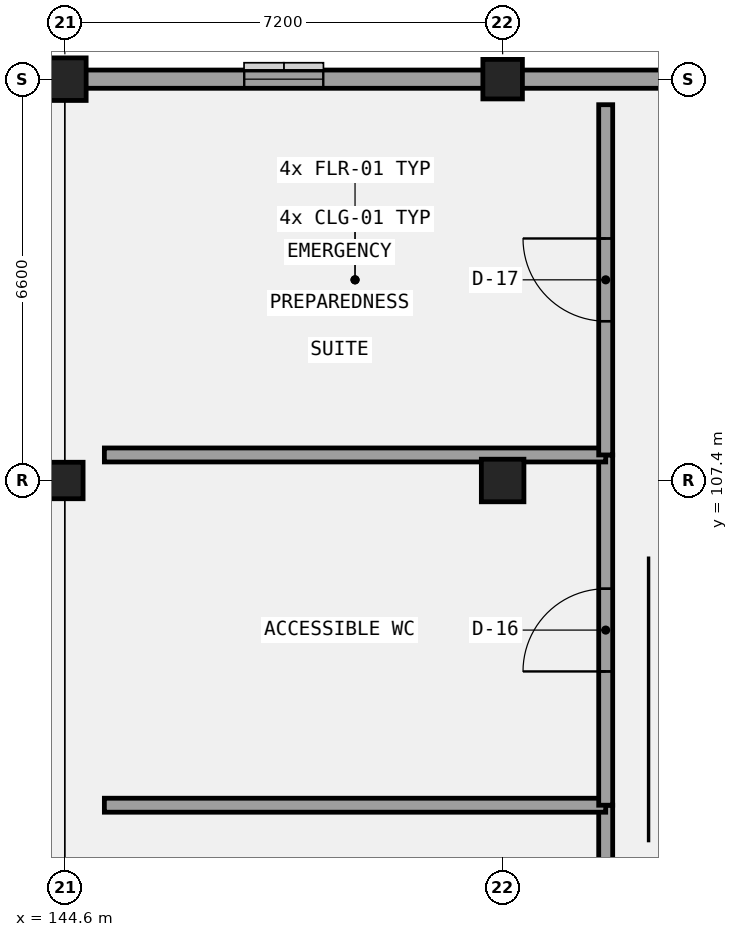
"""IFC4 building model, lengths in metres.
Left out: names, types, materials, properties, quantities, classifications, styles, units other than length and angle.
Written with IfcOpenShell. Run it as: python <this file> out.ifc"""

import sys

from ifc_helpers import new_model, si_unit, direction, frame, frame_2d, origin, origin_2d, place, context, subcontext, project, spatial, rectangle, extrude, element, fill, save


model = new_model("IFC4")
c1 = context("Model", 3, precision=1e-05, world=origin(), true_north=direction((0.0, 1.0)))
c2 = subcontext(c1, "Body", "Model", "MODEL_VIEW")
j1 = project(units=[si_unit("LENGTHUNIT", "METRE"), si_unit("PLANEANGLEUNIT", "RADIAN")], contexts=[c1])
p1 = place(None, origin())
s1 = spatial("IfcSite", under=j1, at=p1, CompositionType="ELEMENT")
p2 = place(p1, origin())
s2 = spatial("IfcBuilding", under=s1, at=p2, CompositionType="ELEMENT")
p3 = place(p2, frame((0.0, 0.0, 9.6)))
s3 = spatial("IfcBuildingStorey", under=s2, at=p3, CompositionType="ELEMENT", Elevation=9.6)
p4 = place(p3, frame((144.6, 107.4, 0.0), z_axis=(0.0, 0.0, 1.0), x_axis=(1.0, 0.0, 0.0)))
e1 = element("IfcColumn", 1, at=p4, inside=s3, PredefinedType="COLUMN", context=c2, shape_type="SweptSolid", body=[
    extrude(rectangle(XDim=0.6, YDim=0.6, at=origin_2d()), origin(), (0.0, 0.0, 1.0), 4.2),
])
for number, where, z_axis, x_axis in (
    (2, (144.6, 114.0, 0.0), (0.0, 0.0, 1.0), (1.0, 0.0, 0.0)),
    (3, (151.8, 107.4, 0.0), (0.0, 0.0, 1.0), (1.0, 0.0, 0.0)),
):
    element("IfcColumn", number, at=place(p3, frame(where, z_axis=z_axis, x_axis=x_axis)), inside=s3, PredefinedType="COLUMN", context=c2, shape_type="SweptSolid", body=[
        extrude(rectangle(XDim=0.7, YDim=0.7, at=origin_2d()), origin(), (0.0, 0.0, 1.0), 4.2),
    ])
p5 = place(p3, frame((151.8, 114.0, 0.0), z_axis=(0.0, 0.0, 1.0), x_axis=(1.0, 0.0, 0.0)))
e4 = element("IfcColumn", 4, at=p5, inside=s3, PredefinedType="COLUMN", context=c2, shape_type="SweptSolid", body=[
    extrude(rectangle(XDim=0.65, YDim=0.65, at=origin_2d()), origin(), (0.0, 0.0, 1.0), 4.2),
])
p6 = place(p3, frame((166.35, 114.0, 0.0), z_axis=(0.0, 0.0, 1.0), x_axis=(-1.0, 0.0, 0.0)))
e5 = element("IfcWall", 5, at=p6, inside=s3, PredefinedType="SOLIDWALL", context=c2, shape_type="SweptSolid", body=[
    extrude(rectangle(XDim=21.9, YDim=0.3, at=frame_2d((10.95, 0.0))), origin(), (0.0, 0.0, 1.0), 3.19),
])
p7 = place(p6, frame((17.5, 0.0, 0.95)))
e6 = element("IfcOpeningElement", 6, at=p7, cuts=e5, PredefinedType="OPENING", context=c2, shape_type="SweptSolid", body=[
    extrude(rectangle(XDim=1.3, YDim=1.65, at=frame_2d((0.65, 0.825))), frame((0.0, 0.16, 0.0), z_axis=(0.0, -1.0, 0.0), x_axis=(1.0, 0.0, 0.0)), (0.0, 0.0, 1.0), 0.32),
])
p8 = place(p3, frame((144.75, 114.0, 0.0), z_axis=(0.0, 0.0, 1.0), x_axis=(-1.0, 0.0, 0.0)))
e7 = element("IfcWall", 7, at=p8, inside=s3, PredefinedType="SOLIDWALL", context=c2, shape_type="SweptSolid", body=[
    extrude(rectangle(XDim=36.3, YDim=0.3, at=frame_2d((18.15, 0.0))), origin(), (0.0, 0.0, 1.0), 3.19),
])
p9 = place(p8, frame((31.9, 0.0, 0.95)))
e8 = element("IfcOpeningElement", 8, at=p9, cuts=e7, PredefinedType="OPENING", context=c2, shape_type="SweptSolid", body=[
    extrude(rectangle(XDim=1.3, YDim=1.65, at=frame_2d((0.65, 0.825))), frame((0.0, 0.16, 0.0), z_axis=(0.0, -1.0, 0.0), x_axis=(1.0, 0.0, 0.0)), (0.0, 0.0, 1.0), 0.32),
])
p10 = place(p8, frame((24.7, 0.0, 0.95)))
e9 = element("IfcOpeningElement", 9, at=p10, cuts=e7, PredefinedType="OPENING", context=c2, shape_type="SweptSolid", body=[
    extrude(rectangle(XDim=1.3, YDim=1.9, at=frame_2d((0.65, 0.95))), frame((0.0, 0.16, 0.0), z_axis=(0.0, -1.0, 0.0), x_axis=(1.0, 0.0, 0.0)), (0.0, 0.0, 1.0), 0.32),
])
p11 = place(p8, frame((17.425, 0.0, 0.95)))
e10 = element("IfcOpeningElement", 10, at=p11, cuts=e7, PredefinedType="OPENING", context=c2, shape_type="SweptSolid", body=[
    extrude(rectangle(XDim=1.45, YDim=1.4, at=frame_2d((0.725, 0.7))), frame((0.0, 0.16, 0.0), z_axis=(0.0, -1.0, 0.0), x_axis=(1.0, 0.0, 0.0)), (0.0, 0.0, 1.0), 0.32),
])
p12 = place(p8, frame((10.225, 0.0, 0.95)))
e11 = element("IfcOpeningElement", 11, at=p12, cuts=e7, PredefinedType="OPENING", context=c2, shape_type="SweptSolid", body=[
    extrude(rectangle(XDim=1.45, YDim=1.65, at=frame_2d((0.725, 0.825))), frame((0.0, 0.16, 0.0), z_axis=(0.0, -1.0, 0.0), x_axis=(1.0, 0.0, 0.0)), (0.0, 0.0, 1.0), 0.32),
])
p13 = place(p8, frame((3.025, 0.0, 0.95)))
e12 = element("IfcOpeningElement", 12, at=p13, cuts=e7, PredefinedType="OPENING", context=c2, shape_type="SweptSolid", body=[
    extrude(rectangle(XDim=1.45, YDim=1.9, at=frame_2d((0.725, 0.95))), frame((0.0, 0.16, 0.0), z_axis=(0.0, -1.0, 0.0), x_axis=(1.0, 0.0, 0.0)), (0.0, 0.0, 1.0), 0.32),
])
p14 = place(p3, frame((153.495, 96.3, 0.0), z_axis=(0.0, 0.0, 1.0), x_axis=(0.0, 1.0, 0.0)))
e13 = element("IfcWall", 13, at=p14, inside=s3, PredefinedType="PARTITIONING", context=c2, shape_type="SweptSolid", body=[
    extrude(rectangle(XDim=5.76, YDim=0.23, at=frame_2d((2.88, 0.0))), origin(), (0.0, 0.0, 1.0), 3.94),
])
p15 = place(p14, frame((1.406, 0.0, 0.0)))
e14 = element("IfcOpeningElement", 14, at=p15, cuts=e13, PredefinedType="OPENING", context=c2, shape_type="SweptSolid", body=[
    extrude(rectangle(XDim=1.22, YDim=2.35, at=frame_2d((0.61, 1.175))), frame((0.0, 0.125, 0.0), z_axis=(0.0, -1.0, 0.0), x_axis=(1.0, 0.0, 0.0)), (0.0, 0.0, 1.0), 0.25),
])
p16 = place(p3, frame((145.25, 102.06, 0.0), z_axis=(0.0, 0.0, 1.0), x_axis=(1.0, 0.0, 0.0)))
e15 = element("IfcWall", 15, at=p16, inside=s3, PredefinedType="PARTITIONING", context=c2, shape_type="SweptSolid", body=[
    extrude(rectangle(XDim=8.245, YDim=0.23, at=frame_2d((4.123, 0.0))), origin(), (0.0, 0.0, 1.0), 3.39),
])
p17 = place(p3, frame((153.495, 102.06, 0.0), z_axis=(0.0, 0.0, 1.0), x_axis=(0.0, 1.0, 0.0)))
e16 = element("IfcWall", 16, at=p17, inside=s3, PredefinedType="PARTITIONING", context=c2, shape_type="SweptSolid", body=[
    extrude(rectangle(XDim=5.76, YDim=0.23, at=frame_2d((2.88, 0.0))), origin(), (0.0, 0.0, 1.0), 3.94),
])
p18 = place(p17, frame((2.2, 0.0, 0.0)))
e17 = element("IfcOpeningElement", 17, at=p18, cuts=e16, PredefinedType="OPENING", context=c2, shape_type="SweptSolid", body=[
    extrude(rectangle(XDim=1.36, YDim=2.1, at=frame_2d((0.68, 1.05))), frame((0.0, 0.125, 0.0), z_axis=(0.0, -1.0, 0.0), x_axis=(1.0, 0.0, 0.0)), (0.0, 0.0, 1.0), 0.25),
])
p19 = place(p3, frame((145.25, 107.82, 0.0), z_axis=(0.0, 0.0, 1.0), x_axis=(1.0, 0.0, 0.0)))
e18 = element("IfcWall", 18, at=p19, inside=s3, PredefinedType="PARTITIONING", context=c2, shape_type="SweptSolid", body=[
    extrude(rectangle(XDim=8.245, YDim=0.23, at=frame_2d((4.123, 0.0))), origin(), (0.0, 0.0, 1.0), 3.94),
])
p20 = place(p3, frame((153.495, 107.82, 0.0), z_axis=(0.0, 0.0, 1.0), x_axis=(0.0, 1.0, 0.0)))
e19 = element("IfcWall", 19, at=p20, inside=s3, PredefinedType="PARTITIONING", context=c2, shape_type="SweptSolid", body=[
    extrude(rectangle(XDim=5.76, YDim=0.23, at=frame_2d((2.88, 0.0))), origin(), (0.0, 0.0, 1.0), 3.94),
])
p21 = place(p20, frame((2.2, 0.0, 0.0)))
e20 = element("IfcOpeningElement", 20, at=p21, cuts=e19, PredefinedType="OPENING", context=c2, shape_type="SweptSolid", body=[
    extrude(rectangle(XDim=1.36, YDim=2.22, at=frame_2d((0.68, 1.11))), frame((0.0, 0.125, 0.0), z_axis=(0.0, -1.0, 0.0), x_axis=(1.0, 0.0, 0.0)), (0.0, 0.0, 1.0), 0.25),
])
p22 = place(p7, origin())
e21 = element("IfcWindow", 21, at=p22, inside=s3, PartitioningType="SINGLE_PANEL", PredefinedType="WINDOW", context=c2, shape_type="SweptSolid", body=[
    extrude(rectangle(XDim=1.3, YDim=1.65, at=frame_2d((0.65, 0.825))), frame((0.0, 0.03, 0.0), z_axis=(0.0, -1.0, 0.0), x_axis=(1.0, 0.0, 0.0)), (0.0, 0.0, 1.0), 0.06),
])
fill(e6, e21)
p23 = place(p18, frame((1.36, 0.0, 0.0), z_axis=(0.0, 0.0, 1.0), x_axis=(-1.0, 0.0, 0.0)))
e22 = element("IfcDoor", 22, at=p23, inside=s3, OperationType="SINGLE_SWING_LEFT", PredefinedType="DOOR", context=c2, shape_type="SweptSolid", body=[
    extrude(rectangle(XDim=1.36, YDim=2.1, at=frame_2d((0.68, 1.05))), frame((0.0, 0.025, 0.0), z_axis=(0.0, -1.0, 0.0), x_axis=(1.0, 0.0, 0.0)), (0.0, 0.0, 1.0), 0.05),
])
fill(e17, e22)
p24 = place(p21, frame((1.36, 0.0, 0.0), z_axis=(0.0, 0.0, 1.0), x_axis=(-1.0, 0.0, 0.0)))
e23 = element("IfcDoor", 23, at=p24, inside=s3, OperationType="SINGLE_SWING_RIGHT", PredefinedType="DOOR", context=c2, shape_type="SweptSolid", body=[
    extrude(rectangle(XDim=1.36, YDim=2.22, at=frame_2d((0.68, 1.11))), frame((0.0, 0.025, 0.0), z_axis=(0.0, -1.0, 0.0), x_axis=(1.0, 0.0, 0.0)), (0.0, 0.0, 1.0), 0.05),
])
fill(e20, e23)
save(model, sys.argv[1])
